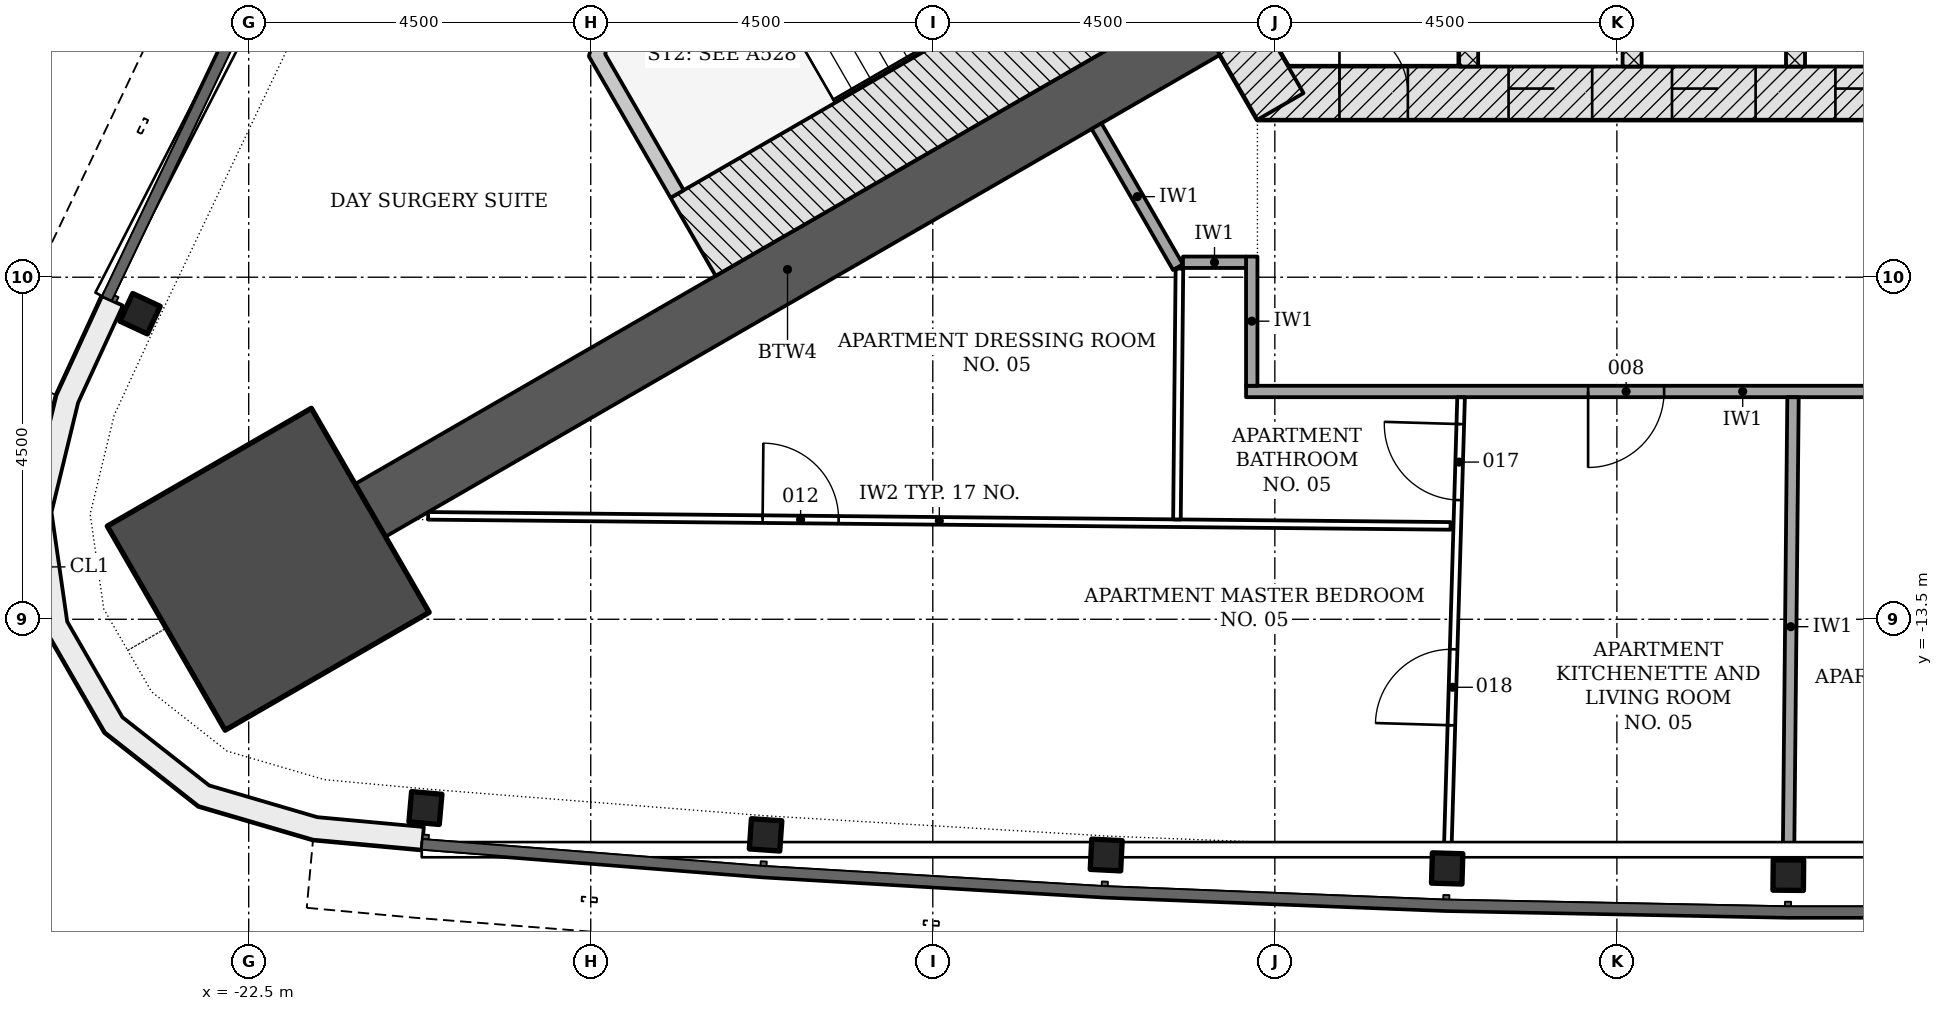
"""IFC4 building model, lengths in metres.
Left out: names, types, materials, properties, quantities, classifications, styles, units other than length and angle.
Written with IfcOpenShell. Run it as: python <this file> out.ifc"""

import sys

from ifc_helpers import new_model, si_unit, direction, frame, frame_2d, origin, origin_2d, place, context, subcontext, project, spatial, polyline, rectangle, i_section, outline, extrude, element, fill, save


model = new_model("IFC4")
c1 = context("Model", 3, precision=1e-05, world=origin(), true_north=direction((0.0, 1.0)))
c2 = subcontext(c1, "Body", "Model", "MODEL_VIEW")
j1 = project(units=[si_unit("LENGTHUNIT", "METRE"), si_unit("PLANEANGLEUNIT", "RADIAN")], contexts=[c1])
p1 = place(None, origin())
s1 = spatial("IfcSite", under=j1, at=p1, CompositionType="ELEMENT")
p2 = place(p1, origin())
s2 = spatial("IfcBuilding", under=s1, at=p2, CompositionType="ELEMENT")
p3 = place(p2, frame((0.0, 0.0, 98.7)))
s3 = spatial("IfcBuildingStorey", under=s2, at=p3, CompositionType="ELEMENT", Elevation=98.7)
p4 = place(p3, frame((-9.229, -6.578, -0.2), z_axis=(0.0, 0.0, 1.0), x_axis=(1.0, 0.0, 0.0)))
e1 = element("IfcWall", 1, at=p4, inside=s3, PredefinedType="SHEAR", context=c2, shape_type="SweptSolid", body=[
    extrude(rectangle(XDim=18.458, YDim=0.7, at=frame_2d((9.229, 0.0))), origin(), (0.0, 0.0, 1.0), 3.6),
])
p5 = place(p4, frame((3.304, 0.0, 0.2)))
e2 = element("IfcOpeningElement", 2, at=p5, cuts=e1, PredefinedType="OPENING", context=c2, shape_type="SweptSolid", body=[
    extrude(rectangle(XDim=1.1, YDim=2.1, at=frame_2d((0.55, 1.05))), frame((0.0, 0.36, 0.0), z_axis=(0.0, -1.0, 0.0), x_axis=(1.0, 0.0, 0.0)), (0.0, 0.0, 1.0), 0.72),
])
p6 = place(p4, frame((5.454, 0.0, 0.2)))
e3 = element("IfcOpeningElement", 3, at=p6, cuts=e1, PredefinedType="OPENING", context=c2, shape_type="SweptSolid", body=[
    extrude(rectangle(XDim=1.1, YDim=2.1, at=frame_2d((0.55, 1.05))), frame((0.0, 0.36, 0.0), z_axis=(0.0, -1.0, 0.0), x_axis=(1.0, 0.0, 0.0)), (0.0, 0.0, 1.0), 0.72),
])
p7 = place(p4, frame((7.604, 0.0, 0.2)))
e4 = element("IfcOpeningElement", 4, at=p7, cuts=e1, PredefinedType="OPENING", context=c2, shape_type="SweptSolid", body=[
    extrude(rectangle(XDim=1.1, YDim=2.1, at=frame_2d((0.55, 1.05))), frame((0.0, 0.36, 0.0), z_axis=(0.0, -1.0, 0.0), x_axis=(1.0, 0.0, 0.0)), (0.0, 0.0, 1.0), 0.72),
])
p8 = place(p4, frame((9.754, 0.0, 0.2)))
e5 = element("IfcOpeningElement", 5, at=p8, cuts=e1, PredefinedType="OPENING", context=c2, shape_type="SweptSolid", body=[
    extrude(rectangle(XDim=1.1, YDim=2.1, at=frame_2d((0.55, 1.05))), frame((0.0, 0.36, 0.0), z_axis=(0.0, -1.0, 0.0), x_axis=(1.0, 0.0, 0.0)), (0.0, 0.0, 1.0), 0.72),
])
p9 = place(p4, frame((11.904, 0.0, 0.2)))
e6 = element("IfcOpeningElement", 6, at=p9, cuts=e1, PredefinedType="OPENING", context=c2, shape_type="SweptSolid", body=[
    extrude(rectangle(XDim=1.1, YDim=2.1, at=frame_2d((0.55, 1.05))), frame((0.0, 0.36, 0.0), z_axis=(0.0, -1.0, 0.0), x_axis=(1.0, 0.0, 0.0)), (0.0, 0.0, 1.0), 0.72),
])
p10 = place(p4, frame((14.054, 0.0, 0.2)))
e7 = element("IfcOpeningElement", 7, at=p10, cuts=e1, PredefinedType="OPENING", context=c2, shape_type="SweptSolid", body=[
    extrude(rectangle(XDim=1.1, YDim=2.1, at=frame_2d((0.55, 1.05))), frame((0.0, 0.36, 0.0), z_axis=(0.0, -1.0, 0.0), x_axis=(1.0, 0.0, 0.0)), (0.0, 0.0, 1.0), 0.72),
])
p11 = place(p4, frame((1.079, 0.0, 0.2)))
e8 = element("IfcOpeningElement", 8, at=p11, cuts=e1, PredefinedType="OPENING", context=c2, shape_type="SweptSolid", body=[
    extrude(rectangle(XDim=0.9, YDim=2.1, at=frame_2d((0.45, 1.05))), frame((0.0, 0.36, 0.0), z_axis=(0.0, -1.0, 0.0), x_axis=(1.0, 0.0, 0.0)), (0.0, 0.0, 1.0), 0.72),
])
p12 = place(p3, frame((-10.311, -4.353, -0.2), z_axis=(0.0, 0.0, 1.0), x_axis=(0.500042739161, -0.866000726912, 0.0)))
e9 = element("IfcWall", 9, at=p12, inside=s3, PredefinedType="SHEAR", context=c2, shape_type="SweptSolid", body=[
    extrude(rectangle(XDim=2.771, YDim=0.7, at=frame_2d((1.386, 0.0))), origin(), (0.0, 0.0, 1.0), 3.6),
])
p13 = place(p3, frame((-9.922, -5.728, -0.2), z_axis=(0.0, 0.0, 1.0), x_axis=(-0.866029086277, -0.499993621681, 0.0)))
e10 = element("IfcWall", 10, at=p13, inside=s3, PredefinedType="SHEAR", context=c2, shape_type="SweptSolid", body=[
    extrude(rectangle(XDim=12.677, YDim=0.8, at=frame_2d((6.339, 0.0))), origin(), (0.0, 0.0, 1.0), 3.6),
])
p14 = place(p3, frame((-22.243, -12.842, -0.2), z_axis=(0.0, 0.0, 1.0), x_axis=(-0.866025403784, -0.5, 0.0)))
e11 = element("IfcColumn", 11, at=p14, inside=s3, PredefinedType="COLUMN", context=c2, shape_type="SweptSolid", body=[
    extrude(rectangle(XDim=3.1, YDim=3.1, at=origin_2d()), origin(), (0.0, 0.0, 1.0), 3.6),
])
for number, where, z_axis, x_axis in (
    (12, (-23.929, -9.48, -0.2), (0.0, 0.0, 1.0), (-0.421, -0.907, 0.0)),
    (13, (-20.175, -15.983, -0.2), (0.0, 0.0, 1.0), (0.996, -0.088, 0.0)),
    (14, (-15.7, -16.336, -0.2), (0.0, 0.0, 1.0), (0.998, -0.069, 0.0)),
    (15, (-11.219, -16.601, -0.2), (0.0, 0.0, 1.0), (0.999, -0.049, 0.0)),
    (16, (-6.733, -16.778, -0.2), (0.0, 0.0, 1.0), (1.0, -0.03, 0.0)),
    (17, (-2.245, -16.866, -0.2), (0.0, 0.0, 1.0), (1.0, -0.01, 0.0)),
):
    element("IfcColumn", number, at=place(p3, frame(where, z_axis=z_axis, x_axis=x_axis)), inside=s3, PredefinedType="COLUMN", context=c2, shape_type="SweptSolid", body=[
        extrude(i_section(OverallWidth=0.401, OverallDepth=0.399, WebThickness=0.025, FlangeThickness=0.04, FilletRadius=0.015, at=origin_2d()), origin(), (0.0, 0.0, 1.0), 3.6),
    ])
p15 = place(p3, origin())
e18 = element("IfcWall", 18, at=p15, inside=s3, PredefinedType="NOTDEFINED", context=c2, shape_type="SweptSolid", body=[
    extrude(outline(polyline([(-24.428, -9.249), (-25.03, -10.553), (-25.4, -12.077), (-25.177, -13.63), (-24.392, -14.989), (-23.159, -15.958), (-21.654, -16.4), (-20.224, -16.531), (-20.196, -16.232), (-21.597, -16.104), (-23.019, -15.687), (-24.161, -14.789), (-24.888, -13.53), (-25.094, -12.092), (-24.745, -10.652), (-24.156, -9.374), (-24.428, -9.249)])), origin(), (0.0, 0.0, 1.0), 3.3),
])
for number, where, z_axis, x_axis in (
    (19, (-6.45, -6.228, -0.2), (0.0, 0.0, 1.0), (0.0, 1.0, 0.0)),
    (20, (-4.3, -6.228, -0.2), (0.0, 0.0, 1.0), (0.0, 1.0, 0.0)),
    (21, (-2.15, -6.228, -0.2), (0.0, 0.0, 1.0), (0.0, 1.0, 0.0)),
):
    element("IfcWall", number, at=place(p3, frame(where, z_axis=z_axis, x_axis=x_axis)), inside=s3, PredefinedType="PARTITIONING", context=c2, shape_type="SweptSolid", body=[
        extrude(rectangle(XDim=2.5, YDim=0.25, at=frame_2d((1.25, 0.0))), origin(), (0.0, 0.0, 1.0), 3.6),
    ])
p16 = place(p3, frame((-10.418, -4.868, -0.2), z_axis=(0.0, 0.0, 1.0), x_axis=(-0.866018442252, -0.500012057535, 0.0)))
e22 = element("IfcWall", 22, at=p16, inside=s3, PredefinedType="SHEAR", context=c2, shape_type="SweptSolid", body=[
    extrude(rectangle(XDim=7.2, YDim=1.186, at=frame_2d((3.6, 0.0))), origin(), (0.0, 0.0, 1.0), 3.6),
])
p17 = place(p3, frame((0.0, 0.0, -0.2)))
e23 = element("IfcWall", 23, at=p17, inside=s3, PredefinedType="SHEAR", context=c2, shape_type="SweptSolid", body=[
    extrude(outline(polyline([(-17.439, -3.907), (-18.025, -6.093), (-16.95, -7.955), (-16.777, -7.855), (-17.81, -6.065), (-17.267, -4.039), (-17.339, -4.081), (-17.339, -4.081), (-17.339, -4.081), (-17.339, -4.081), (-17.339, -4.081), (-17.339, -4.081), (-17.339, -4.081), (-17.339, -4.081), (-17.339, -4.081), (-17.339, -4.081), (-17.339, -4.081), (-17.339, -4.081), (-17.339, -4.081), (-17.339, -4.081), (-17.339, -4.081), (-17.339, -4.081), (-17.339, -4.081), (-17.439, -3.907)])), origin(), (0.0, 0.0, 1.0), 3.6),
])
p18 = place(p3, frame((3.689, -10.503, 0.0), z_axis=(0.0, 0.0, 1.0), x_axis=(-1.0, 0.0, 0.0)))
e24 = element("IfcWall", 24, at=p18, inside=s3, PredefinedType="PARTITIONING", context=c2, shape_type="SweptSolid", body=[
    extrude(rectangle(XDim=13.068, YDim=0.15, at=frame_2d((6.534, 0.0))), origin(), (0.0, 0.0, 1.0), 2.778),
])
p19 = place(p18, frame((7.568, 0.0, 0.0)))
e25 = element("IfcOpeningElement", 25, at=p19, cuts=e24, PredefinedType="OPENING", context=c2, shape_type="SweptSolid", body=[
    extrude(rectangle(XDim=1.0, YDim=2.1, at=frame_2d((0.5, 1.05))), frame((0.0, 0.085, 0.0), z_axis=(0.0, -1.0, 0.0), x_axis=(1.0, 0.0, 0.0)), (0.0, 0.0, 1.0), 0.17),
])
p20 = place(p18, frame((2.501, 0.0, 0.0)))
e26 = element("IfcOpeningElement", 26, at=p20, cuts=e24, PredefinedType="OPENING", context=c2, shape_type="SweptSolid", body=[
    extrude(rectangle(XDim=1.0, YDim=2.1, at=frame_2d((0.5, 1.05))), frame((0.0, 0.085, 0.0), z_axis=(0.0, -1.0, 0.0), x_axis=(1.0, 0.0, 0.0)), (0.0, 0.0, 1.0), 0.17),
])
p21 = place(p3, frame((-11.345, -7.012, 0.0), z_axis=(0.0, 0.0, 1.0), x_axis=(0.499998569178, -0.866026229868, 0.0)))
e27 = element("IfcWall", 27, at=p21, inside=s3, PredefinedType="PARTITIONING", context=c2, shape_type="SweptSolid", body=[
    extrude(rectangle(XDim=2.143, YDim=0.15, at=frame_2d((1.072, 0.0))), origin(), (0.0, 0.0, 1.0), 2.778),
])
p22 = place(p3, frame((-9.304, -10.428, 0.0), z_axis=(0.0, 0.0, 1.0), x_axis=(0.0, 1.0, 0.0)))
e28 = element("IfcWall", 28, at=p22, inside=s3, PredefinedType="PARTITIONING", context=c2, shape_type="SweptSolid", body=[
    extrude(rectangle(XDim=1.7, YDim=0.15, at=frame_2d((0.85, 0.0))), origin(), (0.0, 0.0, 1.0), 3.4),
])
p23 = place(p3, frame((-10.209, -8.803, 0.0), z_axis=(0.0, 0.0, 1.0), x_axis=(1.0, 0.0, 0.0)))
e29 = element("IfcWall", 29, at=p23, inside=s3, PredefinedType="PARTITIONING", context=c2, shape_type="SweptSolid", body=[
    extrude(rectangle(XDim=0.83, YDim=0.15, at=frame_2d((0.415, 0.0))), origin(), (0.0, 0.0, 1.0), 3.4),
])
p24 = place(p3, frame((-2.242, -16.616, 0.0), z_axis=(0.0, 0.0, 1.0), x_axis=(0.009866078621, 0.999951329062, 0.0)))
e30 = element("IfcWall", 30, at=p24, inside=s3, PredefinedType="PARTITIONING", context=c2, shape_type="SweptSolid", body=[
    extrude(rectangle(XDim=6.038, YDim=0.15, at=frame_2d((3.019, 0.0))), origin(), (0.0, 0.0, 1.0), 2.778),
])
p25 = place(p3, frame((-20.14, -12.139, 0.0), z_axis=(0.0, 0.0, 1.0), x_axis=(0.999951618297, -0.009836720277, 0.0)))
e31 = element("IfcWall", 31, at=p25, inside=s3, PredefinedType="PARTITIONING", context=c2, shape_type="SweptSolid", body=[
    extrude(rectangle(XDim=13.452, YDim=0.1, at=frame_2d((6.726, 0.0))), origin(), (0.0, 0.0, 1.0), 2.778),
])
p26 = place(p25, frame((4.401, 0.0, 0.0)))
e32 = element("IfcOpeningElement", 32, at=p26, cuts=e31, PredefinedType="OPENING", context=c2, shape_type="SweptSolid", body=[
    extrude(rectangle(XDim=1.0, YDim=2.1, at=frame_2d((0.5, 1.05))), frame((0.0, 0.06, 0.0), z_axis=(0.0, -1.0, 0.0), x_axis=(1.0, 0.0, 0.0)), (0.0, 0.0, 1.0), 0.12),
])
p27 = place(p3, frame((-6.725, -16.528, 0.0), z_axis=(0.0, 0.0, 1.0), x_axis=(0.029495492599, 0.999564913308, 0.0)))
e33 = element("IfcWall", 33, at=p27, inside=s3, PredefinedType="PARTITIONING", context=c2, shape_type="SweptSolid", body=[
    extrude(rectangle(XDim=5.951, YDim=0.1, at=frame_2d((2.976, 0.0))), origin(), (0.0, 0.0, 1.0), 2.778),
])
p28 = place(p27, frame((4.598, 0.0, 0.0)))
e34 = element("IfcOpeningElement", 34, at=p28, cuts=e33, PredefinedType="OPENING", context=c2, shape_type="SweptSolid", body=[
    extrude(rectangle(XDim=1.0, YDim=2.1, at=frame_2d((0.5, 1.05))), frame((0.0, 0.06, 0.0), z_axis=(0.0, -1.0, 0.0), x_axis=(1.0, 0.0, 0.0)), (0.0, 0.0, 1.0), 0.12),
])
p29 = place(p27, frame((1.635, 0.0, 0.0)))
e35 = element("IfcOpeningElement", 35, at=p29, cuts=e33, PredefinedType="OPENING", context=c2, shape_type="SweptSolid", body=[
    extrude(rectangle(XDim=1.0, YDim=2.1, at=frame_2d((0.5, 1.05))), frame((0.0, 0.06, 0.0), z_axis=(0.0, -1.0, 0.0), x_axis=(1.0, 0.0, 0.0)), (0.0, 0.0, 1.0), 0.12),
])
p30 = place(p3, frame((-10.288, -12.186, 0.0), z_axis=(0.0, 0.0, 1.0), x_axis=(0.009841169114, 0.999951574523, 0.0)))
e36 = element("IfcWall", 36, at=p30, inside=s3, PredefinedType="PARTITIONING", context=c2, shape_type="SweptSolid", body=[
    extrude(rectangle(XDim=3.3, YDim=0.1, at=frame_2d((1.65, 0.0))), origin(), (0.0, 0.0, 1.0), 3.4),
])
p31 = place(p5, origin())
e37 = element("IfcDoor", 37, at=p31, inside=s3, OperationType="DOUBLE_DOOR_SLIDING", PredefinedType="DOOR", context=c2, shape_type="SweptSolid", body=[
    extrude(rectangle(XDim=1.1, YDim=2.1, at=frame_2d((0.55, 1.05))), frame((0.0, 0.025, 0.0), z_axis=(0.0, -1.0, 0.0), x_axis=(1.0, 0.0, 0.0)), (0.0, 0.0, 1.0), 0.05),
])
fill(e2, e37)
p32 = place(p6, origin())
e38 = element("IfcDoor", 38, at=p32, inside=s3, OperationType="DOUBLE_DOOR_SLIDING", PredefinedType="DOOR", context=c2, shape_type="SweptSolid", body=[
    extrude(rectangle(XDim=1.1, YDim=2.1, at=frame_2d((0.55, 1.05))), frame((0.0, 0.025, 0.0), z_axis=(0.0, -1.0, 0.0), x_axis=(1.0, 0.0, 0.0)), (0.0, 0.0, 1.0), 0.05),
])
fill(e3, e38)
p33 = place(p7, origin())
e39 = element("IfcDoor", 39, at=p33, inside=s3, OperationType="DOUBLE_DOOR_SLIDING", PredefinedType="DOOR", context=c2, shape_type="SweptSolid", body=[
    extrude(rectangle(XDim=1.1, YDim=2.1, at=frame_2d((0.55, 1.05))), frame((0.0, 0.025, 0.0), z_axis=(0.0, -1.0, 0.0), x_axis=(1.0, 0.0, 0.0)), (0.0, 0.0, 1.0), 0.05),
])
fill(e4, e39)
p34 = place(p11, origin())
e40 = element("IfcDoor", 40, at=p34, inside=s3, OperationType="SINGLE_SWING_LEFT", PredefinedType="DOOR", context=c2, shape_type="SweptSolid", body=[
    extrude(rectangle(XDim=0.9, YDim=2.1, at=frame_2d((0.45, 1.05))), frame((0.0, 0.075, 0.0), z_axis=(0.0, -1.0, 0.0), x_axis=(1.0, 0.0, 0.0)), (0.0, 0.0, 1.0), 0.15),
])
fill(e8, e40)
p35 = place(p19, origin())
e41 = element("IfcDoor", 41, at=p35, inside=s3, OperationType="SINGLE_SWING_RIGHT", PredefinedType="DOOR", context=c2, shape_type="SweptSolid", body=[
    extrude(rectangle(XDim=1.0, YDim=2.1, at=frame_2d((0.5, 1.05))), frame((0.0, 0.025, 0.0), z_axis=(0.0, -1.0, 0.0), x_axis=(1.0, 0.0, 0.0)), (0.0, 0.0, 1.0), 0.05),
])
fill(e25, e41)
p36 = place(p26, origin())
e42 = element("IfcDoor", 42, at=p36, inside=s3, OperationType="SINGLE_SWING_LEFT", PredefinedType="DOOR", context=c2, shape_type="SweptSolid", body=[
    extrude(rectangle(XDim=1.0, YDim=2.1, at=frame_2d((0.5, 1.05))), frame((0.0, 0.025, 0.0), z_axis=(0.0, -1.0, 0.0), x_axis=(1.0, 0.0, 0.0)), (0.0, 0.0, 1.0), 0.05),
])
fill(e32, e42)
p37 = place(p28, origin())
e43 = element("IfcDoor", 43, at=p37, inside=s3, OperationType="SINGLE_SWING_RIGHT", PredefinedType="DOOR", context=c2, shape_type="SweptSolid", body=[
    extrude(rectangle(XDim=1.0, YDim=2.1, at=frame_2d((0.5, 1.05))), frame((0.0, 0.025, 0.0), z_axis=(0.0, -1.0, 0.0), x_axis=(1.0, 0.0, 0.0)), (0.0, 0.0, 1.0), 0.05),
])
fill(e34, e43)
p38 = place(p29, origin())
e44 = element("IfcDoor", 44, at=p38, inside=s3, OperationType="SINGLE_SWING_LEFT", PredefinedType="DOOR", context=c2, shape_type="SweptSolid", body=[
    extrude(rectangle(XDim=1.0, YDim=2.1, at=frame_2d((0.5, 1.05))), frame((0.0, 0.025, 0.0), z_axis=(0.0, -1.0, 0.0), x_axis=(1.0, 0.0, 0.0)), (0.0, 0.0, 1.0), 0.05),
])
fill(e35, e44)
save(model, sys.argv[1])
